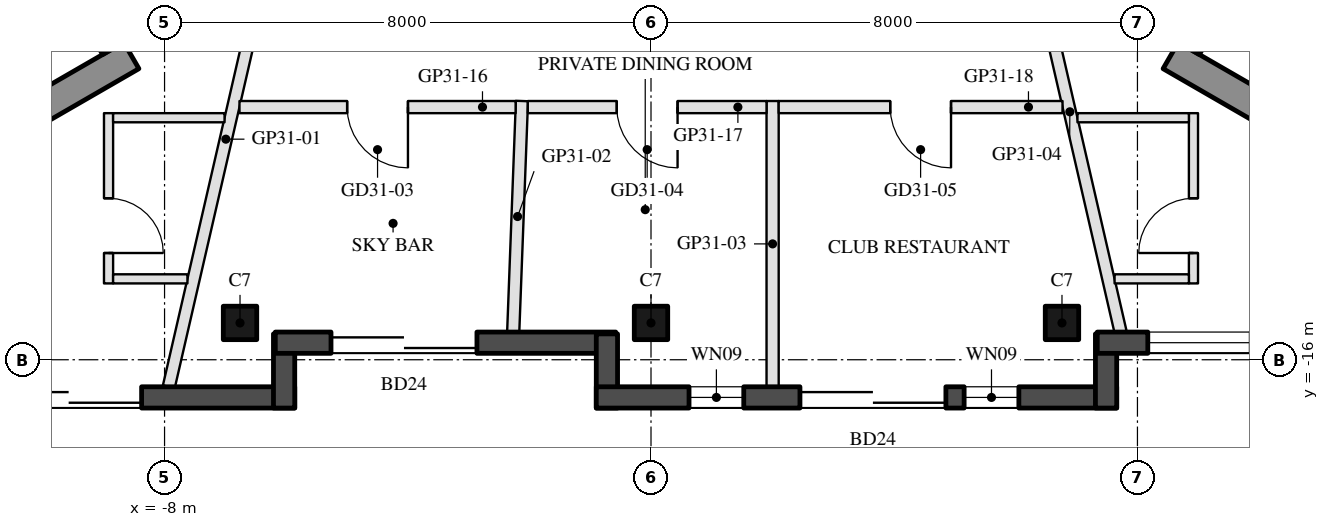
"""IFC4 building model, lengths in metres.
Left out: names, types, materials, properties, quantities, classifications, styles, units other than length and angle.
Written with IfcOpenShell. Run it as: python <this file> out.ifc"""

import sys

from ifc_helpers import new_model, si_unit, direction, frame, frame_2d, origin, origin_2d, place, context, subcontext, project, spatial, rectangle, hollow_rectangle, extrude, boolean, halfspace, element, fill, save


model = new_model("IFC4")
c1 = context("Model", 3, precision=1e-05, world=origin(), true_north=direction((0.0, 1.0)))
c2 = subcontext(c1, "Body", "Model", "MODEL_VIEW")
j1 = project(units=[si_unit("LENGTHUNIT", "METRE"), si_unit("PLANEANGLEUNIT", "RADIAN")], contexts=[c1])
p1 = place(None, origin())
s1 = spatial("IfcSite", under=j1, at=p1, CompositionType="ELEMENT")
p2 = place(p1, origin())
s2 = spatial("IfcBuilding", under=s1, at=p2, CompositionType="ELEMENT")
p3 = place(p2, frame((0.0, 0.0, 305.9)))
s3 = spatial("IfcBuildingStorey", under=s2, at=p3, CompositionType="ELEMENT", Elevation=305.9)
p4 = place(p3, frame((-6.759, -15.395, 0.0), z_axis=(0.0, 0.0, 1.0), x_axis=(-1.0, 0.0, 0.0)))
e1 = element("IfcColumn", 1, at=p4, inside=s3, PredefinedType="COLUMN", context=c2, shape_type="SweptSolid", body=[
    boolean("DIFFERENCE", extrude(hollow_rectangle(XDim=0.55, YDim=0.55, WallThickness=0.025, at=origin_2d()), origin(), (0.0, 0.0, 1.0), 3.7), halfspace(frame((0.0, 0.0, 3.666), z_axis=(0.0, 0.0, 1.0), x_axis=(1.0, 0.0, 0.0)), False)),
])
p5 = place(p3, frame((0.0, -15.395, 0.0), z_axis=(0.0, 0.0, 1.0), x_axis=(-1.0, 0.0, 0.0)))
e2 = element("IfcColumn", 2, at=p5, inside=s3, PredefinedType="COLUMN", context=c2, shape_type="SweptSolid", body=[
    boolean("DIFFERENCE", extrude(hollow_rectangle(XDim=0.55, YDim=0.55, WallThickness=0.025, at=origin_2d()), origin(), (0.0, 0.0, 1.0), 3.7), halfspace(frame((0.0, 0.0, 3.669), z_axis=(0.0, 0.0, 1.0), x_axis=(1.0, 0.0, 0.0)), False)),
])
p6 = place(p3, frame((6.759, -15.395, 0.0), z_axis=(0.0, 0.0, 1.0), x_axis=(-1.0, 0.0, 0.0)))
e3 = element("IfcColumn", 3, at=p6, inside=s3, PredefinedType="COLUMN", context=c2, shape_type="SweptSolid", body=[
    boolean("DIFFERENCE", extrude(hollow_rectangle(XDim=0.55, YDim=0.55, WallThickness=0.025, at=origin_2d()), origin(), (0.0, 0.0, 1.0), 3.7), halfspace(frame((0.0, 0.0, 3.666), z_axis=(0.0, 0.0, 1.0), x_axis=(1.0, 0.0, 0.0)), False)),
])
p7 = place(p3, frame((-16.098, -16.62, 0.0), z_axis=(0.0, 0.0, 1.0), x_axis=(1.0, 0.0, 0.0)))
e4 = element("IfcWall", 4, at=p7, inside=s3, PredefinedType="SOLIDWALL", context=c2, shape_type="SweptSolid", body=[
    extrude(rectangle(XDim=10.239, YDim=0.35, at=frame_2d((5.12, 0.0))), origin(), (0.0, 0.0, 1.0), 3.55),
])
p8 = place(p7, frame((0.381, 0.0, 0.3)))
e5 = element("IfcOpeningElement", 5, at=p8, cuts=e4, PredefinedType="OPENING", context=c2, shape_type="SweptSolid", body=[
    extrude(rectangle(XDim=1.5, YDim=2.65, at=frame_2d((0.75, 1.325))), frame((0.0, 0.185, 0.0), z_axis=(0.0, -1.0, 0.0), x_axis=(1.0, 0.0, 0.0)), (0.0, 0.0, 1.0), 0.37),
])
p9 = place(p7, frame((5.321, 0.0, 0.0)))
e6 = element("IfcOpeningElement", 6, at=p9, cuts=e4, PredefinedType="OPENING", context=c2, shape_type="SweptSolid", body=[
    extrude(rectangle(XDim=2.4, YDim=2.4, at=frame_2d((1.2, 1.2))), frame((0.0, 0.185, 0.0), z_axis=(0.0, -1.0, 0.0), x_axis=(1.0, 0.0, 0.0)), (0.0, 0.0, 1.0), 0.37),
])
p10 = place(p7, frame((3.205, 0.0, 0.3)))
e7 = element("IfcOpeningElement", 7, at=p10, cuts=e4, PredefinedType="OPENING", context=c2, shape_type="SweptSolid", body=[
    extrude(rectangle(XDim=1.8, YDim=2.65, at=frame_2d((0.9, 1.325))), frame((0.0, 0.185, 0.0), z_axis=(0.0, -1.0, 0.0), x_axis=(1.0, 0.0, 0.0)), (0.0, 0.0, 1.0), 0.37),
])
p11 = place(p3, frame((-6.034, -16.795, 0.0), z_axis=(0.0, 0.0, 1.0), x_axis=(0.0, 1.0, 0.0)))
e8 = element("IfcWall", 8, at=p11, inside=s3, PredefinedType="SOLIDWALL", context=c2, shape_type="SweptSolid", body=[
    extrude(rectangle(XDim=1.22, YDim=0.35, at=frame_2d((0.61, 0.0))), origin(), (0.0, 0.0, 1.0), 3.55),
])
p12 = place(p3, frame((-6.179, -15.719, 0.0), z_axis=(0.0, 0.0, 1.0), x_axis=(1.0, 0.0, 0.0)))
e9 = element("IfcWall", 9, at=p12, inside=s3, PredefinedType="SOLIDWALL", context=c2, shape_type="SweptSolid", body=[
    extrude(rectangle(XDim=5.599, YDim=0.35, at=frame_2d((2.799, 0.0))), origin(), (0.0, 0.0, 1.0), 3.55),
])
p13 = place(p12, frame((0.916, 0.0, 0.0)))
e10 = element("IfcOpeningElement", 10, at=p13, cuts=e9, PredefinedType="OPENING", context=c2, shape_type="SweptSolid", body=[
    extrude(rectangle(XDim=2.4, YDim=2.4, at=frame_2d((1.2, 1.2))), frame((0.0, 0.185, 0.0), z_axis=(0.0, -1.0, 0.0), x_axis=(1.0, 0.0, 0.0)), (0.0, 0.0, 1.0), 0.37),
])
p14 = place(p3, frame((-0.725, -15.575, 0.0), z_axis=(0.0, 0.0, 1.0), x_axis=(0.0, -1.0, 0.0)))
e11 = element("IfcWall", 11, at=p14, inside=s3, PredefinedType="SOLIDWALL", context=c2, shape_type="SweptSolid", body=[
    extrude(rectangle(XDim=1.22, YDim=0.35, at=frame_2d((0.61, 0.0))), origin(), (0.0, 0.0, 1.0), 3.55),
])
p15 = place(p3, frame((-0.9, -16.62, 0.0), z_axis=(0.0, 0.0, 1.0), x_axis=(1.0, 0.0, 0.0)))
e12 = element("IfcWall", 12, at=p15, inside=s3, PredefinedType="SOLIDWALL", context=c2, shape_type="SweptSolid", body=[
    extrude(rectangle(XDim=8.559, YDim=0.35, at=frame_2d((4.279, 0.0))), origin(), (0.0, 0.0, 1.0), 3.55),
])
p16 = place(p15, frame((1.525, 0.0, 0.3)))
e13 = element("IfcOpeningElement", 13, at=p16, cuts=e12, PredefinedType="OPENING", context=c2, shape_type="SweptSolid", body=[
    extrude(rectangle(XDim=0.9, YDim=2.65, at=frame_2d((0.45, 1.325))), frame((0.0, 0.185, 0.0), z_axis=(0.0, -1.0, 0.0), x_axis=(1.0, 0.0, 0.0)), (0.0, 0.0, 1.0), 0.37),
])
p17 = place(p15, frame((3.35, 0.0, 0.0)))
e14 = element("IfcOpeningElement", 14, at=p17, cuts=e12, PredefinedType="OPENING", context=c2, shape_type="SweptSolid", body=[
    extrude(rectangle(XDim=2.4, YDim=2.4, at=frame_2d((1.2, 1.2))), frame((0.0, 0.185, 0.0), z_axis=(0.0, -1.0, 0.0), x_axis=(1.0, 0.0, 0.0)), (0.0, 0.0, 1.0), 0.37),
])
p18 = place(p15, frame((6.05, 0.0, 0.3)))
e15 = element("IfcOpeningElement", 15, at=p18, cuts=e12, PredefinedType="OPENING", context=c2, shape_type="SweptSolid", body=[
    extrude(rectangle(XDim=0.9, YDim=2.65, at=frame_2d((0.45, 1.325))), frame((0.0, 0.185, 0.0), z_axis=(0.0, -1.0, 0.0), x_axis=(1.0, 0.0, 0.0)), (0.0, 0.0, 1.0), 0.37),
])
p19 = place(p3, frame((7.484, -16.795, 0.0), z_axis=(0.0, 0.0, 1.0), x_axis=(0.0, 1.0, 0.0)))
e16 = element("IfcWall", 16, at=p19, inside=s3, PredefinedType="SOLIDWALL", context=c2, shape_type="SweptSolid", body=[
    extrude(rectangle(XDim=1.22, YDim=0.35, at=frame_2d((0.61, 0.0))), origin(), (0.0, 0.0, 1.0), 3.55),
])
p20 = place(p3, frame((7.339, -15.719, 0.0), z_axis=(0.0, 0.0, 1.0), x_axis=(1.0, 0.0, 0.0)))
e17 = element("IfcWall", 17, at=p20, inside=s3, PredefinedType="SOLIDWALL", context=c2, shape_type="SweptSolid", body=[
    extrude(rectangle(XDim=5.599, YDim=0.35, at=frame_2d((2.799, 0.0))), origin(), (0.0, 0.0, 1.0), 3.55),
])
p21 = place(p20, frame((2.879, 0.0, 0.0)))
e18 = element("IfcOpeningElement", 18, at=p21, cuts=e17, PredefinedType="OPENING", context=c2, shape_type="SweptSolid", body=[
    extrude(rectangle(XDim=2.4, YDim=2.4, at=frame_2d((1.2, 1.2))), frame((0.0, 0.185, 0.0), z_axis=(0.0, -1.0, 0.0), x_axis=(1.0, 0.0, 0.0)), (0.0, 0.0, 1.0), 0.37),
])
p22 = place(p20, frame((0.831, 0.0, 0.3)))
e19 = element("IfcOpeningElement", 19, at=p22, cuts=e17, PredefinedType="OPENING", context=c2, shape_type="SweptSolid", body=[
    extrude(rectangle(XDim=1.7, YDim=2.65, at=frame_2d((0.85, 1.325))), frame((0.0, 0.185, 0.0), z_axis=(0.0, -1.0, 0.0), x_axis=(1.0, 0.0, 0.0)), (0.0, 0.0, 1.0), 0.37),
])
p23 = place(p3, frame((-8.547, -10.997, 0.0), z_axis=(0.0, 0.0, 1.0), x_axis=(-0.866027279078, -0.499996751883, 0.0)))
e20 = element("IfcWall", 20, at=p23, inside=s3, PredefinedType="SHEAR", context=c2, shape_type="SweptSolid", body=[
    extrude(rectangle(XDim=10.298, YDim=0.5, at=frame_2d((5.149, 0.0))), origin(), (0.0, 0.0, 1.0), 3.5),
])
p24 = place(p3, frame((-13.845, -2.22, 0.0), z_axis=(0.0, 0.0, 1.0), x_axis=(0.500004234368, -0.866022959057, 0.0)))
e21 = element("IfcWall", 21, at=p24, inside=s3, PredefinedType="SHEAR", context=c2, shape_type="SweptSolid", body=[
    extrude(rectangle(XDim=10.0, YDim=0.4, at=frame_2d((5.0, 0.0))), origin(), (0.0, 0.0, 1.0), 3.5),
])
p25 = place(p24, frame((3.55, 0.0, 0.0)))
e22 = element("IfcOpeningElement", 22, at=p25, cuts=e21, PredefinedType="OPENING", context=c2, shape_type="SweptSolid", body=[
    extrude(rectangle(XDim=1.1, YDim=2.1, at=frame_2d((0.55, 1.05))), frame((0.0, 0.21, 0.0), z_axis=(0.0, -1.0, 0.0), x_axis=(1.0, 0.0, 0.0)), (0.0, 0.0, 1.0), 0.42),
])
p26 = place(p24, frame((5.85, 0.0, 0.0)))
e23 = element("IfcOpeningElement", 23, at=p26, cuts=e21, PredefinedType="OPENING", context=c2, shape_type="SweptSolid", body=[
    extrude(rectangle(XDim=1.4, YDim=2.1, at=frame_2d((0.7, 1.05))), frame((0.0, 0.21, 0.0), z_axis=(0.0, -1.0, 0.0), x_axis=(1.0, 0.0, 0.0)), (0.0, 0.0, 1.0), 0.42),
])
p27 = place(p3, frame((8.547, -10.997, 0.0), z_axis=(0.0, 0.0, 1.0), x_axis=(0.866027279078, -0.499996751883, 0.0)))
e24 = element("IfcWall", 24, at=p27, inside=s3, PredefinedType="SHEAR", context=c2, shape_type="SweptSolid", body=[
    extrude(rectangle(XDim=10.298, YDim=0.5, at=frame_2d((5.149, 0.0))), origin(), (0.0, 0.0, 1.0), 3.5),
])
p28 = place(p3, frame((8.845, -10.88, 0.0), z_axis=(0.0, 0.0, 1.0), x_axis=(0.500004234368, 0.866022959057, 0.0)))
e25 = element("IfcWall", 25, at=p28, inside=s3, PredefinedType="SHEAR", context=c2, shape_type="SweptSolid", body=[
    extrude(rectangle(XDim=10.0, YDim=0.4, at=frame_2d((5.0, 0.0))), origin(), (0.0, 0.0, 1.0), 3.5),
])
p29 = place(p28, frame((3.55, 0.0, 0.0)))
e26 = element("IfcOpeningElement", 26, at=p29, cuts=e25, PredefinedType="OPENING", context=c2, shape_type="SweptSolid", body=[
    extrude(rectangle(XDim=1.1, YDim=2.1, at=frame_2d((0.55, 1.05))), frame((0.0, 0.21, 0.0), z_axis=(0.0, -1.0, 0.0), x_axis=(1.0, 0.0, 0.0)), (0.0, 0.0, 1.0), 0.42),
])
p30 = place(p28, frame((5.85, 0.0, 0.0)))
e27 = element("IfcOpeningElement", 27, at=p30, cuts=e25, PredefinedType="OPENING", context=c2, shape_type="SweptSolid", body=[
    extrude(rectangle(XDim=1.4, YDim=2.1, at=frame_2d((0.7, 1.05))), frame((0.0, 0.21, 0.0), z_axis=(0.0, -1.0, 0.0), x_axis=(1.0, 0.0, 0.0)), (0.0, 0.0, 1.0), 0.42),
])
p31 = place(p3, frame((-7.93, -16.445, 0.0), z_axis=(0.0, 0.0, 1.0), x_axis=(0.224458408835, 0.974483669798, 0.0)))
e28 = element("IfcWall", 28, at=p31, inside=s3, PredefinedType="PARTITIONING", context=c2, shape_type="SweptSolid", body=[
    extrude(rectangle(XDim=8.358, YDim=0.2, at=frame_2d((4.179, 0.0))), origin(), (0.0, 0.0, 1.0), 3.1),
])
p32 = place(p3, frame((-2.266, -15.545, 0.0), z_axis=(0.0, 0.0, 1.0), x_axis=(0.037750136795, 0.999287209551, 0.0)))
e29 = element("IfcWall", 29, at=p32, inside=s3, PredefinedType="PARTITIONING", context=c2, shape_type="SweptSolid", body=[
    extrude(rectangle(XDim=3.803, YDim=0.2, at=frame_2d((1.901, 0.0))), origin(), (0.0, 0.0, 1.0), 3.1),
])
p33 = place(p3, frame((2.0, -16.445, 0.0), z_axis=(0.0, 0.0, 1.0), x_axis=(0.0, 1.0, 0.0)))
e30 = element("IfcWall", 30, at=p33, inside=s3, PredefinedType="PARTITIONING", context=c2, shape_type="SweptSolid", body=[
    extrude(rectangle(XDim=4.7, YDim=0.2, at=frame_2d((2.35, 0.0))), origin(), (0.0, 0.0, 1.0), 3.1),
])
p34 = place(p3, frame((7.723, -15.545, 0.0), z_axis=(0.0, 0.0, 1.0), x_axis=(-0.224458954761, 0.974483544052, 0.0)))
e31 = element("IfcWall", 31, at=p34, inside=s3, PredefinedType="PARTITIONING", context=c2, shape_type="SweptSolid", body=[
    extrude(rectangle(XDim=7.434, YDim=0.2, at=frame_2d((3.717, 0.0))), origin(), (0.0, 0.0, 1.0), 3.1),
])
p35 = place(p3, frame((-8.921, -11.945, 0.0), z_axis=(0.0, 0.0, 1.0), x_axis=(0.0, -1.0, 0.0)))
e32 = element("IfcWall", 32, at=p35, inside=s3, PredefinedType="PARTITIONING", context=c2, shape_type="SweptSolid", body=[
    extrude(rectangle(XDim=2.8, YDim=0.15, at=frame_2d((1.4, 0.0))), origin(), (0.0, 0.0, 1.0), 3.1),
])
p36 = place(p35, frame((1.4, 0.0, 0.0)))
e33 = element("IfcOpeningElement", 33, at=p36, cuts=e32, PredefinedType="OPENING", context=c2, shape_type="SweptSolid", body=[
    extrude(rectangle(XDim=0.9, YDim=2.1, at=frame_2d((0.45, 1.05))), frame((0.0, 0.085, 0.0), z_axis=(0.0, -1.0, 0.0), x_axis=(1.0, 0.0, 0.0)), (0.0, 0.0, 1.0), 0.17),
])
p37 = place(p3, frame((-8.846, -14.67, 0.0), z_axis=(0.0, 0.0, 1.0), x_axis=(1.0, 0.0, 0.0)))
e34 = element("IfcWall", 34, at=p37, inside=s3, PredefinedType="PARTITIONING", context=c2, shape_type="SweptSolid", body=[
    extrude(rectangle(XDim=1.222, YDim=0.15, at=frame_2d((0.611, 0.0))), origin(), (0.0, 0.0, 1.0), 3.1),
])
p38 = place(p3, frame((-8.846, -12.02, 0.0), z_axis=(0.0, 0.0, 1.0), x_axis=(1.0, 0.0, 0.0)))
e35 = element("IfcWall", 35, at=p38, inside=s3, PredefinedType="PARTITIONING", context=c2, shape_type="SweptSolid", body=[
    extrude(rectangle(XDim=1.833, YDim=0.15, at=frame_2d((0.917, 0.0))), origin(), (0.0, 0.0, 1.0), 3.55),
])
p39 = place(p3, frame((-2.226, -11.844, 0.0), z_axis=(0.0, 0.0, 1.0), x_axis=(-1.0, 0.0, 0.0)))
e36 = element("IfcWall", 36, at=p39, inside=s3, PredefinedType="PARTITIONING", context=c2, shape_type="SweptSolid", body=[
    extrude(rectangle(XDim=4.542, YDim=0.2, at=frame_2d((2.271, 0.0))), origin(), (0.0, 0.0, 1.0), 3.1),
])
p40 = place(p39, frame((1.771, 0.0, 0.0)))
e37 = element("IfcOpeningElement", 37, at=p40, cuts=e36, PredefinedType="OPENING", context=c2, shape_type="SweptSolid", body=[
    extrude(rectangle(XDim=1.0, YDim=2.1, at=frame_2d((0.5, 1.05))), frame((0.0, 0.11, 0.0), z_axis=(0.0, -1.0, 0.0), x_axis=(1.0, 0.0, 0.0)), (0.0, 0.0, 1.0), 0.22),
])
p41 = place(p3, frame((1.9, -11.844, 0.0), z_axis=(0.0, 0.0, 1.0), x_axis=(-1.0, 0.0, 0.0)))
e38 = element("IfcWall", 38, at=p41, inside=s3, PredefinedType="PARTITIONING", context=c2, shape_type="SweptSolid", body=[
    extrude(rectangle(XDim=3.926, YDim=0.2, at=frame_2d((1.963, 0.0))), origin(), (0.0, 0.0, 1.0), 3.1),
])
p42 = place(p41, frame((1.463, 0.0, 0.0)))
e39 = element("IfcOpeningElement", 39, at=p42, cuts=e38, PredefinedType="OPENING", context=c2, shape_type="SweptSolid", body=[
    extrude(rectangle(XDim=1.0, YDim=2.1, at=frame_2d((0.5, 1.05))), frame((0.0, 0.11, 0.0), z_axis=(0.0, -1.0, 0.0), x_axis=(1.0, 0.0, 0.0)), (0.0, 0.0, 1.0), 0.22),
])
p43 = place(p3, frame((6.768, -11.844, 0.0), z_axis=(0.0, 0.0, 1.0), x_axis=(-1.0, 0.0, 0.0)))
e40 = element("IfcWall", 40, at=p43, inside=s3, PredefinedType="PARTITIONING", context=c2, shape_type="SweptSolid", body=[
    extrude(rectangle(XDim=4.668, YDim=0.2, at=frame_2d((2.334, 0.0))), origin(), (0.0, 0.0, 1.0), 3.1),
])
p44 = place(p43, frame((1.834, 0.0, 0.0)))
e41 = element("IfcOpeningElement", 41, at=p44, cuts=e40, PredefinedType="OPENING", context=c2, shape_type="SweptSolid", body=[
    extrude(rectangle(XDim=1.0, YDim=2.1, at=frame_2d((0.5, 1.05))), frame((0.0, 0.11, 0.0), z_axis=(0.0, -1.0, 0.0), x_axis=(1.0, 0.0, 0.0)), (0.0, 0.0, 1.0), 0.22),
])
p45 = place(p3, frame((8.921, -14.745, 0.0), z_axis=(0.0, 0.0, 1.0), x_axis=(0.0, 1.0, 0.0)))
e42 = element("IfcWall", 42, at=p45, inside=s3, PredefinedType="PARTITIONING", context=c2, shape_type="SweptSolid", body=[
    extrude(rectangle(XDim=2.8, YDim=0.15, at=frame_2d((1.4, 0.0))), origin(), (0.0, 0.0, 1.0), 3.1),
])
p46 = place(p45, frame((0.5, 0.0, 0.0)))
e43 = element("IfcOpeningElement", 43, at=p46, cuts=e42, PredefinedType="OPENING", context=c2, shape_type="SweptSolid", body=[
    extrude(rectangle(XDim=0.9, YDim=2.1, at=frame_2d((0.45, 1.05))), frame((0.0, 0.085, 0.0), z_axis=(0.0, -1.0, 0.0), x_axis=(1.0, 0.0, 0.0)), (0.0, 0.0, 1.0), 0.17),
])
p47 = place(p3, frame((7.624, -14.67, 0.0), z_axis=(0.0, 0.0, 1.0), x_axis=(1.0, 0.0, 0.0)))
e44 = element("IfcWall", 44, at=p47, inside=s3, PredefinedType="PARTITIONING", context=c2, shape_type="SweptSolid", body=[
    extrude(rectangle(XDim=1.222, YDim=0.15, at=frame_2d((0.611, 0.0))), origin(), (0.0, 0.0, 1.0), 3.1),
])
p48 = place(p3, frame((7.013, -12.02, 0.0), z_axis=(0.0, 0.0, 1.0), x_axis=(1.0, 0.0, 0.0)))
e45 = element("IfcWall", 45, at=p48, inside=s3, PredefinedType="PARTITIONING", context=c2, shape_type="SweptSolid", body=[
    extrude(rectangle(XDim=1.833, YDim=0.15, at=frame_2d((0.917, 0.0))), origin(), (0.0, 0.0, 1.0), 3.55),
])
p49 = place(p9, frame((2.4, 0.0, 0.0), z_axis=(0.0, 0.0, 1.0), x_axis=(-1.0, 0.0, 0.0)))
e46 = element("IfcDoor", 46, at=p49, inside=s3, OperationType="SLIDING_TO_LEFT", PredefinedType="DOOR", context=c2, shape_type="SweptSolid", body=[
    extrude(rectangle(XDim=2.4, YDim=2.4, at=frame_2d((1.2, 1.2))), frame((0.0, 0.025, 0.0), z_axis=(0.0, -1.0, 0.0), x_axis=(1.0, 0.0, 0.0)), (0.0, 0.0, 1.0), 0.05),
])
fill(e6, e46)
p50 = place(p13, frame((2.4, 0.0, 0.0), z_axis=(0.0, 0.0, 1.0), x_axis=(-1.0, 0.0, 0.0)))
e47 = element("IfcDoor", 47, at=p50, inside=s3, OperationType="SLIDING_TO_LEFT", PredefinedType="DOOR", context=c2, shape_type="SweptSolid", body=[
    extrude(rectangle(XDim=2.4, YDim=2.4, at=frame_2d((1.2, 1.2))), frame((0.0, 0.025, 0.0), z_axis=(0.0, -1.0, 0.0), x_axis=(1.0, 0.0, 0.0)), (0.0, 0.0, 1.0), 0.05),
])
fill(e10, e47)
p51 = place(p16, origin())
e48 = element("IfcWindow", 48, at=p51, inside=s3, PartitioningType="SINGLE_PANEL", PredefinedType="WINDOW", context=c2, shape_type="SweptSolid", body=[
    extrude(rectangle(XDim=0.9, YDim=2.65, at=frame_2d((0.45, 1.325))), frame((0.0, 0.03, 0.0), z_axis=(0.0, -1.0, 0.0), x_axis=(1.0, 0.0, 0.0)), (0.0, 0.0, 1.0), 0.06),
])
fill(e13, e48)
p52 = place(p17, frame((2.4, 0.0, 0.0), z_axis=(0.0, 0.0, 1.0), x_axis=(-1.0, 0.0, 0.0)))
e49 = element("IfcDoor", 49, at=p52, inside=s3, OperationType="SLIDING_TO_LEFT", PredefinedType="DOOR", context=c2, shape_type="SweptSolid", body=[
    extrude(rectangle(XDim=2.4, YDim=2.4, at=frame_2d((1.2, 1.2))), frame((0.0, 0.025, 0.0), z_axis=(0.0, -1.0, 0.0), x_axis=(1.0, 0.0, 0.0)), (0.0, 0.0, 1.0), 0.05),
])
fill(e14, e49)
p53 = place(p18, origin())
e50 = element("IfcWindow", 50, at=p53, inside=s3, PartitioningType="SINGLE_PANEL", PredefinedType="WINDOW", context=c2, shape_type="SweptSolid", body=[
    extrude(rectangle(XDim=0.9, YDim=2.65, at=frame_2d((0.45, 1.325))), frame((0.0, 0.03, 0.0), z_axis=(0.0, -1.0, 0.0), x_axis=(1.0, 0.0, 0.0)), (0.0, 0.0, 1.0), 0.06),
])
fill(e15, e50)
p54 = place(p22, origin())
e51 = element("IfcWindow", 51, at=p54, inside=s3, PartitioningType="SINGLE_PANEL", PredefinedType="WINDOW", context=c2, shape_type="SweptSolid", body=[
    extrude(rectangle(XDim=1.7, YDim=2.65, at=frame_2d((0.85, 1.325))), frame((0.0, 0.03, 0.0), z_axis=(0.0, -1.0, 0.0), x_axis=(1.0, 0.0, 0.0)), (0.0, 0.0, 1.0), 0.06),
])
fill(e19, e51)
p55 = place(p36, origin())
e52 = element("IfcDoor", 52, at=p55, inside=s3, OperationType="SINGLE_SWING_RIGHT", PredefinedType="DOOR", context=c2, shape_type="SweptSolid", body=[
    extrude(rectangle(XDim=0.9, YDim=2.1, at=frame_2d((0.45, 1.05))), frame((0.0, 0.025, 0.0), z_axis=(0.0, -1.0, 0.0), x_axis=(1.0, 0.0, 0.0)), (0.0, 0.0, 1.0), 0.05),
])
fill(e33, e52)
p56 = place(p40, origin())
e53 = element("IfcDoor", 53, at=p56, inside=s3, OperationType="SINGLE_SWING_LEFT", PredefinedType="DOOR", context=c2, shape_type="SweptSolid", body=[
    extrude(rectangle(XDim=1.0, YDim=2.1, at=frame_2d((0.5, 1.05))), frame((0.0, 0.025, 0.0), z_axis=(0.0, -1.0, 0.0), x_axis=(1.0, 0.0, 0.0)), (0.0, 0.0, 1.0), 0.05),
])
fill(e37, e53)
p57 = place(p42, origin())
e54 = element("IfcDoor", 54, at=p57, inside=s3, OperationType="SINGLE_SWING_LEFT", PredefinedType="DOOR", context=c2, shape_type="SweptSolid", body=[
    extrude(rectangle(XDim=1.0, YDim=2.1, at=frame_2d((0.5, 1.05))), frame((0.0, 0.025, 0.0), z_axis=(0.0, -1.0, 0.0), x_axis=(1.0, 0.0, 0.0)), (0.0, 0.0, 1.0), 0.05),
])
fill(e39, e54)
p58 = place(p44, origin())
e55 = element("IfcDoor", 55, at=p58, inside=s3, OperationType="SINGLE_SWING_LEFT", PredefinedType="DOOR", context=c2, shape_type="SweptSolid", body=[
    extrude(rectangle(XDim=1.0, YDim=2.1, at=frame_2d((0.5, 1.05))), frame((0.0, 0.025, 0.0), z_axis=(0.0, -1.0, 0.0), x_axis=(1.0, 0.0, 0.0)), (0.0, 0.0, 1.0), 0.05),
])
fill(e41, e55)
p59 = place(p46, origin())
e56 = element("IfcDoor", 56, at=p59, inside=s3, OperationType="SINGLE_SWING_LEFT", PredefinedType="DOOR", context=c2, shape_type="SweptSolid", body=[
    extrude(rectangle(XDim=0.9, YDim=2.1, at=frame_2d((0.45, 1.05))), frame((0.0, 0.025, 0.0), z_axis=(0.0, -1.0, 0.0), x_axis=(1.0, 0.0, 0.0)), (0.0, 0.0, 1.0), 0.05),
])
fill(e43, e56)
save(model, sys.argv[1])
